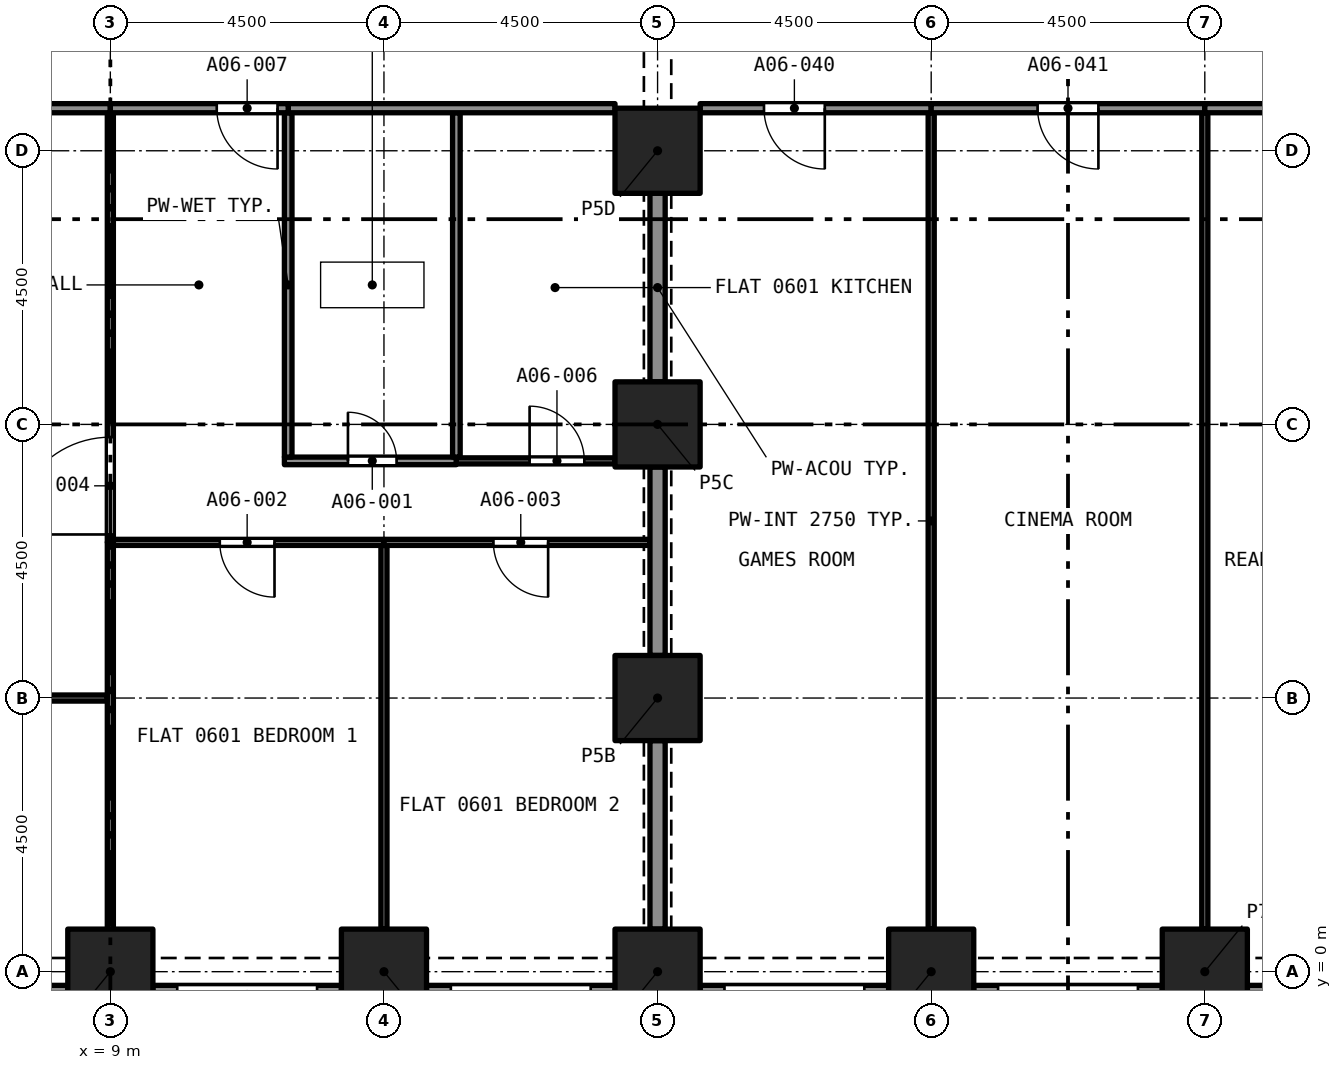
"""IFC4 building model, lengths in metres.
Left out: names, types, materials, properties, quantities, classifications, styles, units other than length and angle.
Written with IfcOpenShell. Run it as: python <this file> out.ifc"""

import sys

from ifc_helpers import new_model, si_unit, direction, frame, frame_2d, origin, origin_2d, place, context, subcontext, project, spatial, rectangle, extrude, element, fill, save


model = new_model("IFC4")
c1 = context("Model", 3, precision=1e-05, world=origin(), true_north=direction((0.0, 1.0)))
c2 = subcontext(c1, "Body", "Model", "MODEL_VIEW")
j1 = project(units=[si_unit("LENGTHUNIT", "METRE"), si_unit("PLANEANGLEUNIT", "RADIAN")], contexts=[c1])
p1 = place(None, origin())
s1 = spatial("IfcSite", under=j1, at=p1, CompositionType="ELEMENT")
p2 = place(p1, origin())
s2 = spatial("IfcBuilding", under=s1, at=p2, CompositionType="ELEMENT")
p3 = place(p2, frame((0.0, 0.0, 30.4)))
s3 = spatial("IfcBuildingStorey", under=s2, at=p3, CompositionType="ELEMENT", Elevation=30.4)
for number, where, z_axis, x_axis in (
    (1, (9.0, 0.0, 0.0), (0.0, 0.0, 1.0), (1.0, 0.0, 0.0)),
    (2, (13.5, 0.0, 0.0), (0.0, 0.0, 1.0), (1.0, 0.0, 0.0)),
    (3, (18.0, 0.0, 0.0), (0.0, 0.0, 1.0), (1.0, 0.0, 0.0)),
    (4, (22.5, 0.0, 0.0), (0.0, 0.0, 1.0), (1.0, 0.0, 0.0)),
    (5, (27.0, 0.0, 0.0), (0.0, 0.0, 1.0), (1.0, 0.0, 0.0)),
    (6, (18.0, 4.5, 0.0), (0.0, 0.0, 1.0), (1.0, 0.0, 0.0)),
    (7, (18.0, 9.0, 0.0), (0.0, 0.0, 1.0), (1.0, 0.0, 0.0)),
    (8, (18.0, 13.5, 0.0), (0.0, 0.0, 1.0), (1.0, 0.0, 0.0)),
):
    element("IfcColumn", number, at=place(p3, frame(where, z_axis=z_axis, x_axis=x_axis)), inside=s3, PredefinedType="COLUMN", context=c2, shape_type="SweptSolid", body=[
        extrude(rectangle(XDim=1.4, YDim=1.4, at=origin_2d()), origin(), (0.0, 0.0, 1.0), 3.2),
    ])
p4 = place(p3, frame((8.3, -0.375, 0.0), z_axis=(0.0, 0.0, 1.0), x_axis=(-1.0, 0.0, 0.0)))
e9 = element("IfcWall", 9, at=p4, inside=s3, PredefinedType="SOLIDWALL", context=c2, shape_type="SweptSolid", body=[
    extrude(rectangle(XDim=3.1, YDim=0.3, at=frame_2d((1.55, 0.0))), origin(), (0.0, 0.0, 1.0), 3.2),
])
p5 = place(p4, frame((0.4, 0.0, 0.45)))
e10 = element("IfcOpeningElement", 10, at=p5, cuts=e9, PredefinedType="OPENING", context=c2, shape_type="SweptSolid", body=[
    extrude(rectangle(XDim=2.3, YDim=1.95, at=frame_2d((1.15, 0.975))), frame((0.0, 0.16, 0.0), z_axis=(0.0, -1.0, 0.0), x_axis=(1.0, 0.0, 0.0)), (0.0, 0.0, 1.0), 0.32),
])
p6 = place(p3, frame((12.8, -0.375, 0.0), z_axis=(0.0, 0.0, 1.0), x_axis=(-1.0, 0.0, 0.0)))
e11 = element("IfcWall", 11, at=p6, inside=s3, PredefinedType="SOLIDWALL", context=c2, shape_type="SweptSolid", body=[
    extrude(rectangle(XDim=3.1, YDim=0.3, at=frame_2d((1.55, 0.0))), origin(), (0.0, 0.0, 1.0), 3.2),
])
p7 = place(p6, frame((0.4, 0.0, 0.45)))
e12 = element("IfcOpeningElement", 12, at=p7, cuts=e11, PredefinedType="OPENING", context=c2, shape_type="SweptSolid", body=[
    extrude(rectangle(XDim=2.3, YDim=1.95, at=frame_2d((1.15, 0.975))), frame((0.0, 0.16, 0.0), z_axis=(0.0, -1.0, 0.0), x_axis=(1.0, 0.0, 0.0)), (0.0, 0.0, 1.0), 0.32),
])
p8 = place(p3, frame((17.3, -0.375, 0.0), z_axis=(0.0, 0.0, 1.0), x_axis=(-1.0, 0.0, 0.0)))
e13 = element("IfcWall", 13, at=p8, inside=s3, PredefinedType="SOLIDWALL", context=c2, shape_type="SweptSolid", body=[
    extrude(rectangle(XDim=3.1, YDim=0.3, at=frame_2d((1.55, 0.0))), origin(), (0.0, 0.0, 1.0), 3.2),
])
p9 = place(p8, frame((0.4, 0.0, 0.45)))
e14 = element("IfcOpeningElement", 14, at=p9, cuts=e13, PredefinedType="OPENING", context=c2, shape_type="SweptSolid", body=[
    extrude(rectangle(XDim=2.3, YDim=1.95, at=frame_2d((1.15, 0.975))), frame((0.0, 0.16, 0.0), z_axis=(0.0, -1.0, 0.0), x_axis=(1.0, 0.0, 0.0)), (0.0, 0.0, 1.0), 0.32),
])
p10 = place(p3, frame((21.8, -0.375, 0.0), z_axis=(0.0, 0.0, 1.0), x_axis=(-1.0, 0.0, 0.0)))
e15 = element("IfcWall", 15, at=p10, inside=s3, PredefinedType="SOLIDWALL", context=c2, shape_type="SweptSolid", body=[
    extrude(rectangle(XDim=3.1, YDim=0.3, at=frame_2d((1.55, 0.0))), origin(), (0.0, 0.0, 1.0), 3.2),
])
p11 = place(p10, frame((0.4, 0.0, 0.45)))
e16 = element("IfcOpeningElement", 16, at=p11, cuts=e15, PredefinedType="OPENING", context=c2, shape_type="SweptSolid", body=[
    extrude(rectangle(XDim=2.3, YDim=1.95, at=frame_2d((1.15, 0.975))), frame((0.0, 0.16, 0.0), z_axis=(0.0, -1.0, 0.0), x_axis=(1.0, 0.0, 0.0)), (0.0, 0.0, 1.0), 0.32),
])
p12 = place(p3, frame((26.3, -0.375, 0.0), z_axis=(0.0, 0.0, 1.0), x_axis=(-1.0, 0.0, 0.0)))
e17 = element("IfcWall", 17, at=p12, inside=s3, PredefinedType="SOLIDWALL", context=c2, shape_type="SweptSolid", body=[
    extrude(rectangle(XDim=3.1, YDim=0.3, at=frame_2d((1.55, 0.0))), origin(), (0.0, 0.0, 1.0), 3.2),
])
p13 = place(p12, frame((0.4, 0.0, 0.45)))
e18 = element("IfcOpeningElement", 18, at=p13, cuts=e17, PredefinedType="OPENING", context=c2, shape_type="SweptSolid", body=[
    extrude(rectangle(XDim=2.3, YDim=1.95, at=frame_2d((1.15, 0.975))), frame((0.0, 0.16, 0.0), z_axis=(0.0, -1.0, 0.0), x_axis=(1.0, 0.0, 0.0)), (0.0, 0.0, 1.0), 0.32),
])
p14 = place(p3, frame((30.8, -0.375, 0.0), z_axis=(0.0, 0.0, 1.0), x_axis=(-1.0, 0.0, 0.0)))
e19 = element("IfcWall", 19, at=p14, inside=s3, PredefinedType="SOLIDWALL", context=c2, shape_type="SweptSolid", body=[
    extrude(rectangle(XDim=3.1, YDim=0.3, at=frame_2d((1.55, 0.0))), origin(), (0.0, 0.0, 1.0), 3.2),
])
p15 = place(p14, frame((0.4, 0.0, 0.45)))
e20 = element("IfcOpeningElement", 20, at=p15, cuts=e19, PredefinedType="OPENING", context=c2, shape_type="SweptSolid", body=[
    extrude(rectangle(XDim=2.3, YDim=1.95, at=frame_2d((1.15, 0.975))), frame((0.0, 0.16, 0.0), z_axis=(0.0, -1.0, 0.0), x_axis=(1.0, 0.0, 0.0)), (0.0, 0.0, 1.0), 0.32),
])
p16 = place(p3, frame((11.863, 8.4, 0.0), z_axis=(0.0, 0.0, 1.0), x_axis=(1.0, 0.0, 0.0)))
e21 = element("IfcWall", 21, at=p16, inside=s3, PredefinedType="PARTITIONING", context=c2, shape_type="SweptSolid", body=[
    extrude(rectangle(XDim=2.828, YDim=0.125, at=frame_2d((1.414, 0.0))), origin(), (0.0, 0.0, 1.0), 2.9),
])
p17 = place(p16, frame((1.045, 0.0, 0.0)))
e22 = element("IfcOpeningElement", 22, at=p17, cuts=e21, PredefinedType="OPENING", context=c2, shape_type="SweptSolid", body=[
    extrude(rectangle(XDim=0.8, YDim=2.1, at=frame_2d((0.4, 1.05))), frame((0.0, 0.073, 0.0), z_axis=(0.0, -1.0, 0.0), x_axis=(1.0, 0.0, 0.0)), (0.0, 0.0, 1.0), 0.145),
])
for number, where, z_axis, x_axis in (
    (23, (11.925, 8.462, 0.0), (0.0, 0.0, 1.0), (0.0, 1.0, 0.0)),
    (24, (14.691, 8.462, 0.0), (0.0, 0.0, 1.0), (0.0, 1.0, 0.0)),
):
    element("IfcWall", number, at=place(p3, frame(where, z_axis=z_axis, x_axis=x_axis)), inside=s3, PredefinedType="PARTITIONING", context=c2, shape_type="SweptSolid", body=[
        extrude(rectangle(XDim=5.663, YDim=0.125, at=frame_2d((2.831, 0.0))), origin(), (0.0, 0.0, 1.0), 2.9),
    ])
p18 = place(p3, frame((11.925, 14.2, 0.0), z_axis=(0.0, 0.0, 1.0), x_axis=(1.0, 0.0, 0.0)))
e25 = element("IfcWall", 25, at=p18, inside=s3, PredefinedType="PARTITIONING", context=c2, shape_type="SweptSolid", body=[
    extrude(rectangle(XDim=5.375, YDim=0.15, at=frame_2d((2.688, 0.0))), origin(), (0.0, 0.0, 1.0), 2.9),
])
p19 = place(p3, frame((13.5, 0.7, 0.0), z_axis=(0.0, 0.0, 1.0), x_axis=(0.0, 1.0, 0.0)))
e26 = element("IfcWall", 26, at=p19, inside=s3, PredefinedType="PARTITIONING", context=c2, shape_type="SweptSolid", body=[
    extrude(rectangle(XDim=6.31, YDim=0.1, at=frame_2d((3.155, 0.0))), origin(), (0.0, 0.0, 1.0), 2.9),
])
p20 = place(p3, frame((13.5, 7.06, 0.0), z_axis=(0.0, 0.0, 1.0), x_axis=(-1.0, 0.0, 0.0)))
e27 = element("IfcWall", 27, at=p20, inside=s3, PredefinedType="PARTITIONING", context=c2, shape_type="SweptSolid", body=[
    extrude(rectangle(XDim=4.45, YDim=0.1, at=frame_2d((2.225, 0.0))), origin(), (0.0, 0.0, 1.0), 2.9),
])
p21 = place(p20, frame((1.8, 0.0, 0.0)))
e28 = element("IfcOpeningElement", 28, at=p21, cuts=e27, PredefinedType="OPENING", context=c2, shape_type="SweptSolid", body=[
    extrude(rectangle(XDim=0.9, YDim=2.1, at=frame_2d((0.45, 1.05))), frame((0.0, 0.06, 0.0), z_axis=(0.0, -1.0, 0.0), x_axis=(1.0, 0.0, 0.0)), (0.0, 0.0, 1.0), 0.12),
])
p22 = place(p3, frame((9.0, 0.7, 0.0), z_axis=(0.0, 0.0, 1.0), x_axis=(0.0, 1.0, 0.0)))
e29 = element("IfcWall", 29, at=p22, inside=s3, PredefinedType="PARTITIONING", context=c2, shape_type="SweptSolid", body=[
    extrude(rectangle(XDim=6.36, YDim=0.1, at=frame_2d((3.18, 0.0))), origin(), (0.0, 0.0, 1.0), 2.9),
])
p23 = place(p3, frame((17.875, 7.06, 0.0), z_axis=(0.0, 0.0, 1.0), x_axis=(-1.0, 0.0, 0.0)))
e30 = element("IfcWall", 30, at=p23, inside=s3, PredefinedType="PARTITIONING", context=c2, shape_type="SweptSolid", body=[
    extrude(rectangle(XDim=4.375, YDim=0.1, at=frame_2d((2.188, 0.0))), origin(), (0.0, 0.0, 1.0), 2.9),
])
p24 = place(p23, frame((1.675, 0.0, 0.0)))
e31 = element("IfcOpeningElement", 31, at=p24, cuts=e30, PredefinedType="OPENING", context=c2, shape_type="SweptSolid", body=[
    extrude(rectangle(XDim=0.9, YDim=2.1, at=frame_2d((0.45, 1.05))), frame((0.0, 0.06, 0.0), z_axis=(0.0, -1.0, 0.0), x_axis=(1.0, 0.0, 0.0)), (0.0, 0.0, 1.0), 0.12),
])
for number, where, z_axis, x_axis in (
    (32, (18.0, 5.2, 0.0), (0.0, 0.0, 1.0), (0.0, 1.0, 0.0)),
    (33, (18.0, 0.7, 0.0), (0.0, 0.0, 1.0), (0.0, 1.0, 0.0)),
):
    element("IfcWall", number, at=place(p3, frame(where, z_axis=z_axis, x_axis=x_axis)), inside=s3, PredefinedType="PARTITIONING", context=c2, shape_type="SweptSolid", body=[
        extrude(rectangle(XDim=3.1, YDim=0.25, at=frame_2d((1.55, 0.0))), origin(), (0.0, 0.0, 1.0), 2.38),
    ])
p25 = place(p3, frame((9.0, 7.06, 0.0), z_axis=(0.0, 0.0, 1.0), x_axis=(0.0, 1.0, 0.0)))
e34 = element("IfcWall", 34, at=p25, inside=s3, PredefinedType="PARTITIONING", context=c2, shape_type="SweptSolid", body=[
    extrude(rectangle(XDim=7.065, YDim=0.1, at=frame_2d((3.532, 0.0))), origin(), (0.0, 0.0, 1.0), 2.9),
])
p26 = place(p25, frame((0.13, 0.0, 0.0)))
e35 = element("IfcOpeningElement", 35, at=p26, cuts=e34, PredefinedType="OPENING", context=c2, shape_type="SweptSolid", body=[
    extrude(rectangle(XDim=1.6, YDim=2.1, at=frame_2d((0.8, 1.05))), frame((0.0, 0.06, 0.0), z_axis=(0.0, -1.0, 0.0), x_axis=(1.0, 0.0, 0.0)), (0.0, 0.0, 1.0), 0.12),
])
p27 = place(p3, frame((0.758, 4.5, 0.0), z_axis=(0.0, 0.0, 1.0), x_axis=(1.0, 0.0, 0.0)))
e36 = element("IfcWall", 36, at=p27, inside=s3, PredefinedType="PARTITIONING", context=c2, shape_type="SweptSolid", body=[
    extrude(rectangle(XDim=8.192, YDim=0.1, at=frame_2d((4.096, 0.0))), origin(), (0.0, 0.0, 1.0), 2.9),
])
p28 = place(p27, frame((3.292, 0.0, 0.0)))
e37 = element("IfcOpeningElement", 37, at=p28, cuts=e36, PredefinedType="OPENING", context=c2, shape_type="SweptSolid", body=[
    extrude(rectangle(XDim=1.6, YDim=2.1, at=frame_2d((0.8, 1.05))), frame((0.0, 0.06, 0.0), z_axis=(0.0, -1.0, 0.0), x_axis=(1.0, 0.0, 0.0)), (0.0, 0.0, 1.0), 0.12),
])
p29 = place(p3, frame((0.7, 14.2, 0.0), z_axis=(0.0, 0.0, 1.0), x_axis=(1.0, 0.0, 0.0)))
e38 = element("IfcWall", 38, at=p29, inside=s3, PredefinedType="PARTITIONING", context=c2, shape_type="SweptSolid", body=[
    extrude(rectangle(XDim=8.3, YDim=0.15, at=frame_2d((4.15, 0.0))), origin(), (0.0, 0.0, 1.0), 2.9),
])
p30 = place(p3, frame((14.69, 8.4, 0.0), z_axis=(0.0, 0.0, 1.0), x_axis=(1.0, 0.0, 0.0)))
e39 = element("IfcWall", 39, at=p30, inside=s3, PredefinedType="PARTITIONING", context=c2, shape_type="SweptSolid", body=[
    extrude(rectangle(XDim=2.61, YDim=0.1, at=frame_2d((1.305, 0.0))), origin(), (0.0, 0.0, 1.0), 2.9),
])
p31 = place(p30, frame((1.205, 0.0, 0.0)))
e40 = element("IfcOpeningElement", 40, at=p31, cuts=e39, PredefinedType="OPENING", context=c2, shape_type="SweptSolid", body=[
    extrude(rectangle(XDim=0.9, YDim=2.1, at=frame_2d((0.45, 1.05))), frame((0.0, 0.06, 0.0), z_axis=(0.0, -1.0, 0.0), x_axis=(1.0, 0.0, 0.0)), (0.0, 0.0, 1.0), 0.12),
])
p32 = place(p3, frame((11.925, 14.2, 0.0), z_axis=(0.0, 0.0, 1.0), x_axis=(-1.0, 0.0, 0.0)))
e41 = element("IfcWall", 41, at=p32, inside=s3, PredefinedType="PARTITIONING", context=c2, shape_type="SweptSolid", body=[
    extrude(rectangle(XDim=2.925, YDim=0.15, at=frame_2d((1.462, 0.0))), origin(), (0.0, 0.0, 1.0), 2.9),
])
p33 = place(p32, frame((0.175, 0.0, 0.0)))
e42 = element("IfcOpeningElement", 42, at=p33, cuts=e41, PredefinedType="OPENING", context=c2, shape_type="SweptSolid", body=[
    extrude(rectangle(XDim=1.0, YDim=2.1, at=frame_2d((0.5, 1.05))), frame((0.0, 0.085, 0.0), z_axis=(0.0, -1.0, 0.0), x_axis=(1.0, 0.0, 0.0)), (0.0, 0.0, 1.0), 0.17),
])
p34 = place(p3, frame((18.0, 9.7, 0.0), z_axis=(0.0, 0.0, 1.0), x_axis=(0.0, 1.0, 0.0)))
e43 = element("IfcWall", 43, at=p34, inside=s3, PredefinedType="PARTITIONING", context=c2, shape_type="SweptSolid", body=[
    extrude(rectangle(XDim=3.1, YDim=0.25, at=frame_2d((1.55, 0.0))), origin(), (0.0, 0.0, 1.0), 2.38),
])
p35 = place(p3, frame((22.5, 0.7, 0.0), z_axis=(0.0, 0.0, 1.0), x_axis=(0.0, 1.0, 0.0)))
e44 = element("IfcWall", 44, at=p35, inside=s3, PredefinedType="PARTITIONING", context=c2, shape_type="SweptSolid", body=[
    extrude(rectangle(XDim=13.425, YDim=0.1, at=frame_2d((6.712, 0.0))), origin(), (0.0, 0.0, 1.0), 2.75),
])
p36 = place(p3, frame((22.5, 14.2, 0.0), z_axis=(0.0, 0.0, 1.0), x_axis=(-1.0, 0.0, 0.0)))
e45 = element("IfcWall", 45, at=p36, inside=s3, PredefinedType="PARTITIONING", context=c2, shape_type="SweptSolid", body=[
    extrude(rectangle(XDim=3.8, YDim=0.15, at=frame_2d((1.9, 0.0))), origin(), (0.0, 0.0, 1.0), 2.75),
])
p37 = place(p36, frame((1.75, 0.0, 0.0)))
e46 = element("IfcOpeningElement", 46, at=p37, cuts=e45, PredefinedType="OPENING", context=c2, shape_type="SweptSolid", body=[
    extrude(rectangle(XDim=1.0, YDim=2.1, at=frame_2d((0.5, 1.05))), frame((0.0, 0.085, 0.0), z_axis=(0.0, -1.0, 0.0), x_axis=(1.0, 0.0, 0.0)), (0.0, 0.0, 1.0), 0.17),
])
p38 = place(p3, frame((27.0, 0.7, 0.0), z_axis=(0.0, 0.0, 1.0), x_axis=(0.0, 1.0, 0.0)))
e47 = element("IfcWall", 47, at=p38, inside=s3, PredefinedType="PARTITIONING", context=c2, shape_type="SweptSolid", body=[
    extrude(rectangle(XDim=13.425, YDim=0.1, at=frame_2d((6.712, 0.0))), origin(), (0.0, 0.0, 1.0), 2.75),
])
p39 = place(p3, frame((27.0, 14.2, 0.0), z_axis=(0.0, 0.0, 1.0), x_axis=(-1.0, 0.0, 0.0)))
e48 = element("IfcWall", 48, at=p39, inside=s3, PredefinedType="PARTITIONING", context=c2, shape_type="SweptSolid", body=[
    extrude(rectangle(XDim=4.5, YDim=0.15, at=frame_2d((2.25, 0.0))), origin(), (0.0, 0.0, 1.0), 2.75),
])
p40 = place(p39, frame((1.75, 0.0, 0.0)))
e49 = element("IfcOpeningElement", 49, at=p40, cuts=e48, PredefinedType="OPENING", context=c2, shape_type="SweptSolid", body=[
    extrude(rectangle(XDim=1.0, YDim=2.1, at=frame_2d((0.5, 1.05))), frame((0.0, 0.085, 0.0), z_axis=(0.0, -1.0, 0.0), x_axis=(1.0, 0.0, 0.0)), (0.0, 0.0, 1.0), 0.17),
])
p41 = place(p3, frame((30.8, 14.2, 0.0), z_axis=(0.0, 0.0, 1.0), x_axis=(-1.0, 0.0, 0.0)))
e50 = element("IfcWall", 50, at=p41, inside=s3, PredefinedType="PARTITIONING", context=c2, shape_type="SweptSolid", body=[
    extrude(rectangle(XDim=3.8, YDim=0.15, at=frame_2d((1.9, 0.0))), origin(), (0.0, 0.0, 1.0), 2.75),
])
p42 = place(p41, frame((1.05, 0.0, 0.0)))
e51 = element("IfcOpeningElement", 51, at=p42, cuts=e50, PredefinedType="OPENING", context=c2, shape_type="SweptSolid", body=[
    extrude(rectangle(XDim=1.0, YDim=2.1, at=frame_2d((0.5, 1.05))), frame((0.0, 0.085, 0.0), z_axis=(0.0, -1.0, 0.0), x_axis=(1.0, 0.0, 0.0)), (0.0, 0.0, 1.0), 0.17),
])
p43 = place(p17, origin())
e52 = element("IfcDoor", 52, at=p43, inside=s3, OperationType="SINGLE_SWING_RIGHT", PredefinedType="DOOR", context=c2, shape_type="SweptSolid", body=[
    extrude(rectangle(XDim=0.8, YDim=2.1, at=frame_2d((0.4, 1.05))), frame((0.0, 0.025, 0.0), z_axis=(0.0, -1.0, 0.0), x_axis=(1.0, 0.0, 0.0)), (0.0, 0.0, 1.0), 0.05),
])
fill(e22, e52)
p44 = place(p21, origin())
e53 = element("IfcDoor", 53, at=p44, inside=s3, OperationType="SINGLE_SWING_RIGHT", PredefinedType="DOOR", context=c2, shape_type="SweptSolid", body=[
    extrude(rectangle(XDim=0.9, YDim=2.1, at=frame_2d((0.45, 1.05))), frame((0.0, 0.025, 0.0), z_axis=(0.0, -1.0, 0.0), x_axis=(1.0, 0.0, 0.0)), (0.0, 0.0, 1.0), 0.05),
])
fill(e28, e53)
p45 = place(p24, origin())
e54 = element("IfcDoor", 54, at=p45, inside=s3, OperationType="SINGLE_SWING_LEFT", PredefinedType="DOOR", context=c2, shape_type="SweptSolid", body=[
    extrude(rectangle(XDim=0.9, YDim=2.1, at=frame_2d((0.45, 1.05))), frame((0.0, 0.025, 0.0), z_axis=(0.0, -1.0, 0.0), x_axis=(1.0, 0.0, 0.0)), (0.0, 0.0, 1.0), 0.05),
])
fill(e31, e54)
p46 = place(p26, origin())
e55 = element("IfcDoor", 55, at=p46, inside=s3, OperationType="SINGLE_SWING_LEFT", PredefinedType="DOOR", context=c2, shape_type="SweptSolid", body=[
    extrude(rectangle(XDim=1.6, YDim=2.1, at=frame_2d((0.8, 1.05))), frame((0.0, 0.025, 0.0), z_axis=(0.0, -1.0, 0.0), x_axis=(1.0, 0.0, 0.0)), (0.0, 0.0, 1.0), 0.05),
])
fill(e35, e55)
p47 = place(p31, origin())
e56 = element("IfcDoor", 56, at=p47, inside=s3, OperationType="SINGLE_SWING_RIGHT", PredefinedType="DOOR", context=c2, shape_type="SweptSolid", body=[
    extrude(rectangle(XDim=0.9, YDim=2.1, at=frame_2d((0.45, 1.05))), frame((0.0, 0.025, 0.0), z_axis=(0.0, -1.0, 0.0), x_axis=(1.0, 0.0, 0.0)), (0.0, 0.0, 1.0), 0.05),
])
fill(e40, e56)
p48 = place(p33, origin())
e57 = element("IfcDoor", 57, at=p48, inside=s3, OperationType="SINGLE_SWING_LEFT", PredefinedType="DOOR", context=c2, shape_type="SweptSolid", body=[
    extrude(rectangle(XDim=1.0, YDim=2.1, at=frame_2d((0.5, 1.05))), frame((0.0, 0.025, 0.0), z_axis=(0.0, -1.0, 0.0), x_axis=(1.0, 0.0, 0.0)), (0.0, 0.0, 1.0), 0.05),
])
fill(e42, e57)
p49 = place(p37, origin())
e58 = element("IfcDoor", 58, at=p49, inside=s3, OperationType="SINGLE_SWING_RIGHT", PredefinedType="DOOR", context=c2, shape_type="SweptSolid", body=[
    extrude(rectangle(XDim=1.0, YDim=2.1, at=frame_2d((0.5, 1.05))), frame((0.0, 0.025, 0.0), z_axis=(0.0, -1.0, 0.0), x_axis=(1.0, 0.0, 0.0)), (0.0, 0.0, 1.0), 0.05),
])
fill(e46, e58)
p50 = place(p40, origin())
e59 = element("IfcDoor", 59, at=p50, inside=s3, OperationType="SINGLE_SWING_RIGHT", PredefinedType="DOOR", context=c2, shape_type="SweptSolid", body=[
    extrude(rectangle(XDim=1.0, YDim=2.1, at=frame_2d((0.5, 1.05))), frame((0.0, 0.025, 0.0), z_axis=(0.0, -1.0, 0.0), x_axis=(1.0, 0.0, 0.0)), (0.0, 0.0, 1.0), 0.05),
])
fill(e49, e59)
save(model, sys.argv[1])
